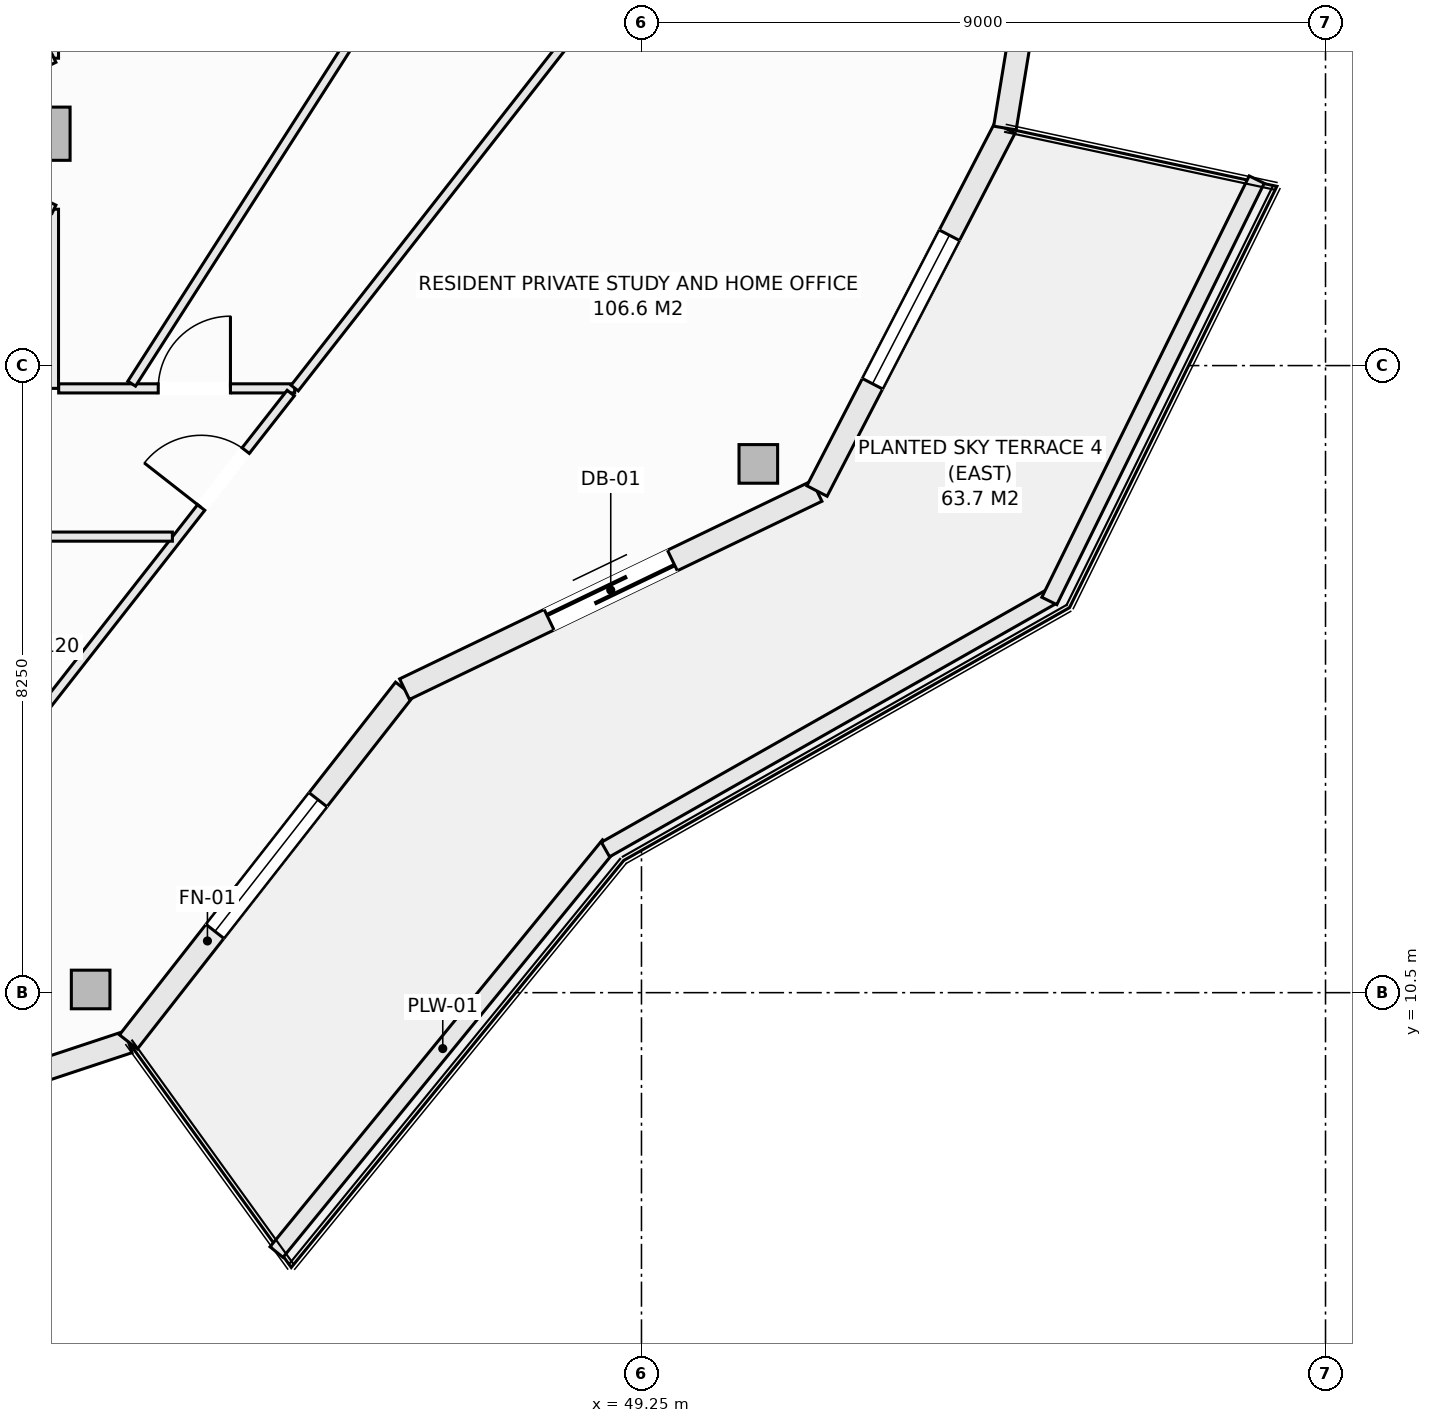
"""IFC4 building model, lengths in metres.
Left out: names, types, materials, properties, quantities, classifications, styles, units other than length and angle.
Written with IfcOpenShell. Run it as: python <this file> out.ifc"""

import sys

from ifc_helpers import new_model, si_unit, direction, frame, frame_2d, origin, origin_2d, place, context, subcontext, project, spatial, rectangle, hollow_rectangle, extrude, element, fill, save


model = new_model("IFC4")
c1 = context("Model", 3, precision=1e-05, world=origin(), true_north=direction((0.0, 1.0)))
c2 = subcontext(c1, "Body", "Model", "MODEL_VIEW")
j1 = project(units=[si_unit("LENGTHUNIT", "METRE"), si_unit("PLANEANGLEUNIT", "RADIAN")], contexts=[c1])
p1 = place(None, origin())
s1 = spatial("IfcSite", under=j1, at=p1, CompositionType="ELEMENT")
p2 = place(p1, origin())
s2 = spatial("IfcBuilding", under=s1, at=p2, CompositionType="ELEMENT")
p3 = place(p2, frame((0.0, 0.0, 209.6)))
s3 = spatial("IfcBuildingStorey", under=s2, at=p3, CompositionType="ELEMENT", Elevation=209.6)
for number, where, z_axis, x_axis in (
    (1, (42.003, 10.542, -0.27), (0.0, 0.0, 1.0), (1.0, 0.0, 0.0)),
    (2, (50.787, 17.456, -0.27), (0.0, 0.0, 1.0), (1.0, 0.0, 0.0)),
):
    element("IfcColumn", number, at=place(p3, frame(where, z_axis=z_axis, x_axis=x_axis)), inside=s3, PredefinedType="COLUMN", context=c2, shape_type="SweptSolid", body=[
        extrude(hollow_rectangle(XDim=0.508, YDim=0.508, WallThickness=0.019, at=origin_2d()), origin(), (0.0, 0.0, 1.0), 3.3),
    ])
p4 = place(p3, frame((41.382, 21.801, -0.27), z_axis=(0.0, 0.0, 1.0), x_axis=(1.0, 0.0, 0.0)))
e3 = element("IfcColumn", 3, at=p4, inside=s3, PredefinedType="COLUMN", context=c2, shape_type="SweptSolid", body=[
    extrude(rectangle(XDim=0.7, YDim=0.7, at=origin_2d()), origin(), (0.0, 0.0, 1.0), 3.3),
])
p5 = place(p3, frame((36.531, 7.875, 0.0), z_axis=(0.0, 0.0, 1.0), x_axis=(0.949240877604, 0.314550085495, 0.0)))
e4 = element("IfcWall", 4, at=p5, inside=s3, PredefinedType="SOLIDWALL", context=c2, shape_type="SweptSolid", body=[
    extrude(rectangle(XDim=6.288, YDim=0.3, at=frame_2d((3.144, 0.0))), origin(), (0.0, 0.0, 1.0), 2.605),
])
p6 = place(p5, frame((2.044, 0.0, 0.72)))
e5 = element("IfcOpeningElement", 5, at=p6, cuts=e4, PredefinedType="OPENING", context=c2, shape_type="SweptSolid", body=[
    extrude(rectangle(XDim=2.2, YDim=1.65, at=frame_2d((1.1, 0.825))), frame((0.0, 0.16, 0.0), z_axis=(0.0, -1.0, 0.0), x_axis=(1.0, 0.0, 0.0)), (0.0, 0.0, 1.0), 0.32),
])
p7 = place(p3, frame((42.5, 9.853, 0.0), z_axis=(0.0, 0.0, 1.0), x_axis=(0.616450126935, 0.787393955401, 0.0)))
e6 = element("IfcWall", 6, at=p7, inside=s3, PredefinedType="SOLIDWALL", context=c2, shape_type="SweptSolid", body=[
    extrude(rectangle(XDim=5.893, YDim=0.3, at=frame_2d((2.946, 0.0))), origin(), (0.0, 0.0, 1.0), 2.605),
])
p8 = place(p7, frame((1.846, 0.0, 0.72)))
e7 = element("IfcOpeningElement", 7, at=p8, cuts=e6, PredefinedType="OPENING", context=c2, shape_type="SweptSolid", body=[
    extrude(rectangle(XDim=2.2, YDim=1.65, at=frame_2d((1.1, 0.825))), frame((0.0, 0.16, 0.0), z_axis=(0.0, -1.0, 0.0), x_axis=(1.0, 0.0, 0.0)), (0.0, 0.0, 1.0), 0.32),
])
p9 = place(p3, frame((46.133, 14.493, 0.0), z_axis=(0.0, 0.0, 1.0), x_axis=(0.901348331142, 0.433094892545, 0.0)))
e8 = element("IfcWall", 8, at=p9, inside=s3, PredefinedType="SOLIDWALL", context=c2, shape_type="SweptSolid", body=[
    extrude(rectangle(XDim=6.021, YDim=0.3, at=frame_2d((3.01, 0.0))), origin(), (0.0, 0.0, 1.0), 2.605),
])
p10 = place(p9, frame((2.11, 0.0, 0.0)))
e9 = element("IfcOpeningElement", 9, at=p10, cuts=e8, PredefinedType="OPENING", context=c2, shape_type="SweptSolid", body=[
    extrude(rectangle(XDim=1.8, YDim=2.25, at=frame_2d((0.9, 1.125))), frame((0.0, 0.16, 0.0), z_axis=(0.0, -1.0, 0.0), x_axis=(1.0, 0.0, 0.0)), (0.0, 0.0, 1.0), 0.32),
])
p11 = place(p3, frame((51.559, 17.1, 0.0), z_axis=(0.0, 0.0, 1.0), x_axis=(0.459808219482, 0.888018243786, 0.0)))
e10 = element("IfcWall", 10, at=p11, inside=s3, PredefinedType="SOLIDWALL", context=c2, shape_type="SweptSolid", body=[
    extrude(rectangle(XDim=5.378, YDim=0.3, at=frame_2d((2.689, 0.0))), origin(), (0.0, 0.0, 1.0), 2.605),
])
p12 = place(p11, frame((1.589, 0.0, 0.72)))
e11 = element("IfcOpeningElement", 11, at=p12, cuts=e10, PredefinedType="OPENING", context=c2, shape_type="SweptSolid", body=[
    extrude(rectangle(XDim=2.2, YDim=1.65, at=frame_2d((1.1, 0.825))), frame((0.0, 0.16, 0.0), z_axis=(0.0, -1.0, 0.0), x_axis=(1.0, 0.0, 0.0)), (0.0, 0.0, 1.0), 0.32),
])
p13 = place(p3, frame((54.032, 21.875, 0.0), z_axis=(0.0, 0.0, 1.0), x_axis=(0.16237087798, 0.986729799886, 0.0)))
e12 = element("IfcWall", 12, at=p13, inside=s3, PredefinedType="SOLIDWALL", context=c2, shape_type="SweptSolid", body=[
    extrude(rectangle(XDim=5.193, YDim=0.3, at=frame_2d((2.597, 0.0))), origin(), (0.0, 0.0, 1.0), 2.605),
])
p14 = place(p13, frame((1.497, 0.0, 0.72)))
e13 = element("IfcOpeningElement", 13, at=p14, cuts=e12, PredefinedType="OPENING", context=c2, shape_type="SweptSolid", body=[
    extrude(rectangle(XDim=2.2, YDim=1.65, at=frame_2d((1.1, 0.825))), frame((0.0, 0.16, 0.0), z_axis=(0.0, -1.0, 0.0), x_axis=(1.0, 0.0, 0.0)), (0.0, 0.0, 1.0), 0.32),
])
p15 = place(p3, frame((44.448, 7.087, 0.0), z_axis=(0.0, 0.0, 1.0), x_axis=(0.632697312147, 0.774399193699, 0.0)))
e14 = element("IfcWall", 14, at=p15, inside=s3, PredefinedType="PARAPET", context=c2, shape_type="SweptSolid", body=[
    extrude(rectangle(XDim=6.914, YDim=0.22, at=frame_2d((3.457, 0.0))), origin(), (0.0, 0.0, 1.0), 0.52),
])
p16 = place(p3, frame((48.776, 12.383, 0.0), z_axis=(0.0, 0.0, 1.0), x_axis=(0.869860619267, 0.493297580623, 0.0)))
e15 = element("IfcWall", 15, at=p16, inside=s3, PredefinedType="PARAPET", context=c2, shape_type="SweptSolid", body=[
    extrude(rectangle(XDim=6.743, YDim=0.22, at=frame_2d((3.371, 0.0))), origin(), (0.0, 0.0, 1.0), 0.52),
])
p17 = place(p3, frame((54.616, 15.653, 0.0), z_axis=(0.0, 0.0, 1.0), x_axis=(0.441640961804, 0.897191875162, 0.0)))
e16 = element("IfcWall", 16, at=p17, inside=s3, PredefinedType="PARAPET", context=c2, shape_type="SweptSolid", body=[
    extrude(rectangle(XDim=6.178, YDim=0.22, at=frame_2d((3.089, 0.0))), origin(), (0.0, 0.0, 1.0), 0.52),
])
p18 = place(p3, frame((41.52, 18.45, 0.0), z_axis=(0.0, 0.0, 1.0), x_axis=(0.0, 1.0, 0.0)))
e17 = element("IfcWall", 17, at=p18, inside=s3, PredefinedType="PARTITIONING", context=c2, shape_type="SweptSolid", body=[
    extrude(rectangle(XDim=2.357, YDim=0.12, at=frame_2d((1.178, 0.0))), origin(), (0.0, 0.0, 1.0), 3.03),
])
p19 = place(p3, frame((41.52, 22.794, 0.0), z_axis=(0.0, 0.0, 1.0), x_axis=(0.0, 1.0, 0.0)))
e18 = element("IfcWall", 18, at=p19, inside=s3, PredefinedType="PARTITIONING", context=c2, shape_type="SweptSolid", body=[
    extrude(rectangle(XDim=4.654, YDim=0.12, at=frame_2d((2.327, 0.0))), origin(), (0.0, 0.0, 1.0), 2.478),
])
p20 = place(p19, frame((1.852, 0.0, 0.0)))
e19 = element("IfcOpeningElement", 19, at=p20, cuts=e18, PredefinedType="OPENING", context=c2, shape_type="SweptSolid", body=[
    extrude(rectangle(XDim=0.95, YDim=2.1, at=frame_2d((0.475, 1.05))), frame((0.0, 0.07, 0.0), z_axis=(0.0, -1.0, 0.0), x_axis=(1.0, 0.0, 0.0)), (0.0, 0.0, 1.0), 0.14),
])
for number, where, z_axis, x_axis in (
    (20, (40.986, 22.541, 0.0), (0.0, 0.0, 1.0), (0.904, 0.428, 0.0)),
    (21, (40.986, 21.06, 0.0), (0.0, 0.0, 1.0), (0.904, -0.428, 0.0)),
):
    element("IfcWall", number, at=place(p3, frame(where, z_axis=z_axis, x_axis=x_axis)), inside=s3, PredefinedType="PARTITIONING", context=c2, shape_type="SweptSolid", body=[
        extrude(rectangle(XDim=0.591, YDim=0.12, at=frame_2d((0.295, 0.0))), origin(), (0.0, 0.0, 1.0), 3.03),
    ])
p21 = place(p3, frame((41.582, 18.45, 0.0), z_axis=(0.0, 0.0, 1.0), x_axis=(1.0, 0.0, 0.0)))
e22 = element("IfcWall", 22, at=p21, inside=s3, PredefinedType="PARTITIONING", context=c2, shape_type="SweptSolid", body=[
    extrude(rectangle(XDim=3.105, YDim=0.12, at=frame_2d((1.552, 0.0))), origin(), (0.0, 0.0, 1.0), 3.03),
])
p22 = place(p21, frame((1.31, 0.0, 0.0)))
e23 = element("IfcOpeningElement", 23, at=p22, cuts=e22, PredefinedType="OPENING", context=c2, shape_type="SweptSolid", body=[
    extrude(rectangle(XDim=0.95, YDim=2.1, at=frame_2d((0.475, 1.05))), frame((0.0, 0.07, 0.0), z_axis=(0.0, -1.0, 0.0), x_axis=(1.0, 0.0, 0.0)), (0.0, 0.0, 1.0), 0.14),
])
p23 = place(p3, frame((36.527, 8.034, 0.0), z_axis=(0.0, 0.0, 1.0), x_axis=(0.616547497682, 0.787317714206, 0.0)))
e24 = element("IfcWall", 24, at=p23, inside=s3, PredefinedType="PARTITIONING", context=c2, shape_type="SweptSolid", body=[
    extrude(rectangle(XDim=13.151, YDim=0.12, at=frame_2d((6.576, 0.0))), origin(), (0.0, 0.0, 1.0), 3.03),
])
p24 = place(p23, frame((11.24, 0.0, 0.0)))
e25 = element("IfcOpeningElement", 25, at=p24, cuts=e24, PredefinedType="OPENING", context=c2, shape_type="SweptSolid", body=[
    extrude(rectangle(XDim=0.95, YDim=2.1, at=frame_2d((0.475, 1.05))), frame((0.0, 0.07, 0.0), z_axis=(0.0, -1.0, 0.0), x_axis=(1.0, 0.0, 0.0)), (0.0, 0.0, 1.0), 0.14),
])
p25 = place(p3, frame((44.687, 18.454, 0.0), z_axis=(0.0, 0.0, 1.0), x_axis=(0.616533198311, 0.787328911815, 0.0)))
e26 = element("IfcWall", 26, at=p25, inside=s3, PredefinedType="PARTITIONING", context=c2, shape_type="SweptSolid", body=[
    extrude(rectangle(XDim=15.333, YDim=0.12, at=frame_2d((7.667, 0.0))), origin(), (0.0, 0.0, 1.0), 3.03),
])
p26 = place(p3, frame((39.662, 16.5, 0.0), z_axis=(0.0, 0.0, 1.0), x_axis=(1.0, 0.0, 0.0)))
e27 = element("IfcWall", 27, at=p26, inside=s3, PredefinedType="PARTITIONING", context=c2, shape_type="SweptSolid", body=[
    extrude(rectangle(XDim=3.416, YDim=0.12, at=frame_2d((1.708, 0.0))), origin(), (0.0, 0.0, 1.0), 2.712),
])
p27 = place(p3, frame((42.542, 18.512, 0.0), z_axis=(0.0, 0.0, 1.0), x_axis=(0.538988222434, 0.842313300428, 0.0)))
e28 = element("IfcWall", 28, at=p27, inside=s3, PredefinedType="PARTITIONING", context=c2, shape_type="SweptSolid", body=[
    extrude(rectangle(XDim=18.835, YDim=0.12, at=frame_2d((9.417, 0.0))), origin(), (0.0, 0.0, 1.0), 3.03),
])
p28 = place(p8, origin())
e29 = element("IfcWindow", 29, at=p28, inside=s3, PartitioningType="SINGLE_PANEL", PredefinedType="WINDOW", context=c2, shape_type="SweptSolid", body=[
    extrude(rectangle(XDim=2.2, YDim=1.65, at=frame_2d((1.1, 0.825))), frame((0.0, 0.03, 0.0), z_axis=(0.0, -1.0, 0.0), x_axis=(1.0, 0.0, 0.0)), (0.0, 0.0, 1.0), 0.06),
])
fill(e7, e29)
p29 = place(p10, frame((1.8, 0.0, 0.0), z_axis=(0.0, 0.0, 1.0), x_axis=(-1.0, 0.0, 0.0)))
e30 = element("IfcDoor", 30, at=p29, inside=s3, OperationType="SLIDING_TO_LEFT", PredefinedType="DOOR", context=c2, shape_type="SweptSolid", body=[
    extrude(rectangle(XDim=1.8, YDim=2.25, at=frame_2d((0.9, 1.125))), frame((0.0, 0.025, 0.0), z_axis=(0.0, -1.0, 0.0), x_axis=(1.0, 0.0, 0.0)), (0.0, 0.0, 1.0), 0.05),
])
fill(e9, e30)
p30 = place(p12, origin())
e31 = element("IfcWindow", 31, at=p30, inside=s3, PartitioningType="SINGLE_PANEL", PredefinedType="WINDOW", context=c2, shape_type="SweptSolid", body=[
    extrude(rectangle(XDim=2.2, YDim=1.65, at=frame_2d((1.1, 0.825))), frame((0.0, 0.03, 0.0), z_axis=(0.0, -1.0, 0.0), x_axis=(1.0, 0.0, 0.0)), (0.0, 0.0, 1.0), 0.06),
])
fill(e11, e31)
p31 = place(p24, origin())
e32 = element("IfcDoor", 32, at=p31, inside=s3, OperationType="SINGLE_SWING_LEFT", PredefinedType="DOOR", context=c2, shape_type="SweptSolid", body=[
    extrude(rectangle(XDim=0.95, YDim=2.1, at=frame_2d((0.475, 1.05))), frame((0.0, 0.025, 0.0), z_axis=(0.0, -1.0, 0.0), x_axis=(1.0, 0.0, 0.0)), (0.0, 0.0, 1.0), 0.05),
])
fill(e25, e32)
p32 = place(p22, origin())
e33 = element("IfcDoor", 33, at=p32, inside=s3, OperationType="SINGLE_SWING_RIGHT", PredefinedType="DOOR", context=c2, shape_type="SweptSolid", body=[
    extrude(rectangle(XDim=0.95, YDim=2.1, at=frame_2d((0.475, 1.05))), frame((0.0, 0.025, 0.0), z_axis=(0.0, -1.0, 0.0), x_axis=(1.0, 0.0, 0.0)), (0.0, 0.0, 1.0), 0.05),
])
fill(e23, e33)
save(model, sys.argv[1])
